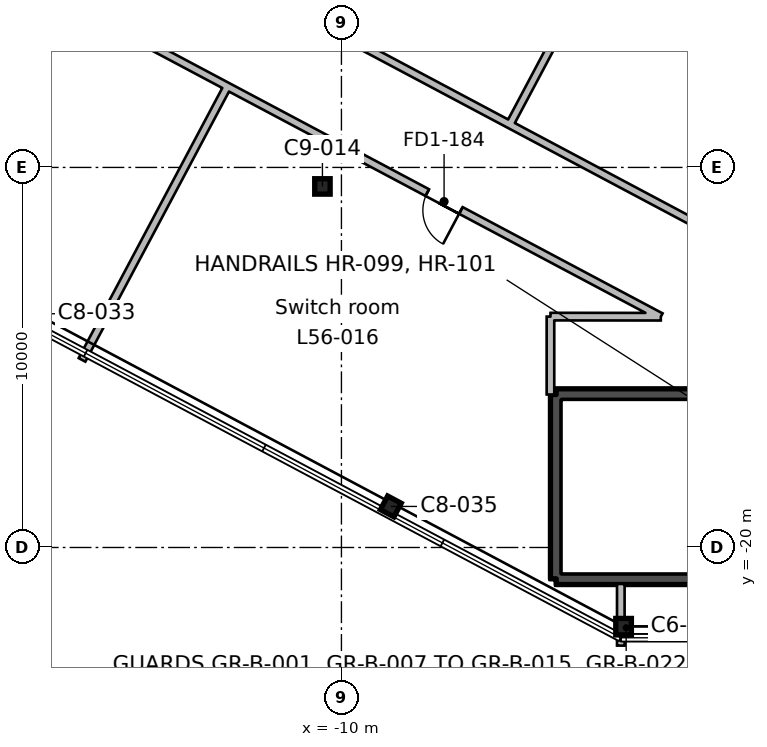
"""IFC4 building model, lengths in metres.
Left out: names, types, materials, properties, quantities, classifications, styles, units other than length and angle.
Written with IfcOpenShell. Run it as: python <this file> out.ifc"""

import sys

from ifc_helpers import new_model, si_unit, direction, frame, frame_2d, origin, origin_2d, place, context, subcontext, project, spatial, rectangle, hollow_rectangle, i_section, extrude, element, fill, save


model = new_model("IFC4")
c1 = context("Model", 3, precision=1e-05, world=origin(), true_north=direction((0.0, 1.0)))
c2 = subcontext(c1, "Body", "Model", "MODEL_VIEW")
j1 = project(units=[si_unit("LENGTHUNIT", "METRE"), si_unit("PLANEANGLEUNIT", "RADIAN")], contexts=[c1])
p1 = place(None, origin())
s1 = spatial("IfcSite", under=j1, at=p1, CompositionType="ELEMENT")
p2 = place(p1, origin())
s2 = spatial("IfcBuilding", under=s1, at=p2, CompositionType="ELEMENT")
p3 = place(p2, frame((0.0, 0.0, 252.0)))
s3 = spatial("IfcBuildingStorey", under=s2, at=p3, CompositionType="ELEMENT", Elevation=252.0)
p4 = place(p3, frame((-2.576, -22.084, 0.0), z_axis=(0.0, 0.0, 1.0), x_axis=(1.0, 0.0, 0.0)))
e1 = element("IfcColumn", 1, at=p4, inside=s3, PredefinedType="COLUMN", context=c2, shape_type="SweptSolid", body=[
    extrude(i_section(OverallWidth=0.412, OverallDepth=0.434, WebThickness=0.036, FlangeThickness=0.057, FilletRadius=0.015, at=origin_2d()), origin(), (0.0, 0.0, 1.0), 6.0),
])
p5 = place(p3, frame((-8.701, -18.92, 0.0), z_axis=(0.0, 0.0, 1.0), x_axis=(0.882947592859, -0.469471562786, 0.0)))
e2 = element("IfcColumn", 2, at=p5, inside=s3, PredefinedType="COLUMN", context=c2, shape_type="SweptSolid", body=[
    extrude(i_section(OverallWidth=0.404, OverallDepth=0.406, WebThickness=0.027, FlangeThickness=0.044, FilletRadius=0.015, at=origin_2d()), origin(), (0.0, 0.0, 1.0), 6.0),
])
p6 = place(p3, frame((-10.5, -10.5, 0.0), z_axis=(0.0, 0.0, 1.0), x_axis=(1.0, 0.0, 0.0)))
e3 = element("IfcColumn", 3, at=p6, inside=s3, PredefinedType="COLUMN", context=c2, shape_type="SweptSolid", body=[
    extrude(hollow_rectangle(XDim=0.406, YDim=0.406, WallThickness=0.015, InnerFilletRadius=0.007, OuterFilletRadius=0.022, at=origin_2d()), origin(), (0.0, 0.0, 1.0), 6.0),
])
p7 = place(p3, frame((3.95, -20.825, 0.0), z_axis=(0.0, 0.0, 1.0), x_axis=(-1.0, 0.0, 0.0)))
e4 = element("IfcWall", 4, at=p7, inside=s3, PredefinedType="SHEAR", context=c2, shape_type="SweptSolid", body=[
    extrude(rectangle(XDim=8.3, YDim=0.3, at=frame_2d((4.15, 0.0))), origin(), (0.0, 0.0, 1.0), 6.0),
])
p8 = place(p3, frame((-4.35, -20.825, 0.0), z_axis=(0.0, 0.0, 1.0), x_axis=(0.0, 1.0, 0.0)))
e5 = element("IfcWall", 5, at=p8, inside=s3, PredefinedType="SHEAR", context=c2, shape_type="SweptSolid", body=[
    extrude(rectangle(XDim=4.85, YDim=0.3, at=frame_2d((2.425, 0.0))), origin(), (0.0, 0.0, 1.0), 6.0),
])
p9 = place(p3, frame((-4.35, -15.975, 0.0), z_axis=(0.0, 0.0, 1.0), x_axis=(1.0, 0.0, 0.0)))
e6 = element("IfcWall", 6, at=p9, inside=s3, PredefinedType="SHEAR", context=c2, shape_type="SweptSolid", body=[
    extrude(rectangle(XDim=8.3, YDim=0.3, at=frame_2d((4.15, 0.0))), origin(), (0.0, 0.0, 1.0), 6.0),
])
p10 = place(p9, frame((6.05, 0.0, 0.0)))
e7 = element("IfcOpeningElement", 7, at=p10, cuts=e6, PredefinedType="OPENING", context=c2, shape_type="SweptSolid", body=[
    extrude(rectangle(XDim=1.9, YDim=2.1, at=frame_2d((0.95, 1.05))), frame((0.0, 0.16, 0.0), z_axis=(0.0, -1.0, 0.0), x_axis=(1.0, 0.0, 0.0)), (0.0, 0.0, 1.0), 0.32),
])
p11 = place(p3, frame((-12.995, -7.871, 0.0), z_axis=(0.0, 0.0, 1.0), x_axis=(-0.882943167342, 0.469479885878, 0.0)))
e8 = element("IfcWall", 8, at=p11, inside=s3, PredefinedType="PARTITIONING", context=c2, shape_type="SweptSolid", body=[
    extrude(rectangle(XDim=36.174, YDim=0.2, at=frame_2d((18.087, 0.0))), origin(), (0.0, 0.0, 1.0), 5.55),
])
p12 = place(p11, frame((21.45, 0.0, 0.0)))
e9 = element("IfcOpeningElement", 9, at=p12, cuts=e8, PredefinedType="OPENING", context=c2, shape_type="SweptSolid", body=[
    extrude(rectangle(XDim=1.0, YDim=2.1, at=frame_2d((0.5, 1.05))), frame((0.0, 0.11, 0.0), z_axis=(0.0, -1.0, 0.0), x_axis=(1.0, 0.0, 0.0)), (0.0, 0.0, 1.0), 0.22),
])
p13 = place(p11, frame((17.55, 0.0, 0.0)))
e10 = element("IfcOpeningElement", 10, at=p13, cuts=e8, PredefinedType="OPENING", context=c2, shape_type="SweptSolid", body=[
    extrude(rectangle(XDim=1.0, YDim=2.1, at=frame_2d((0.5, 1.05))), frame((0.0, 0.11, 0.0), z_axis=(0.0, -1.0, 0.0), x_axis=(1.0, 0.0, 0.0)), (0.0, 0.0, 1.0), 0.22),
])
p14 = place(p3, frame((-12.999, -7.868, 0.0), z_axis=(0.0, 0.0, 1.0), x_axis=(-0.46953845473, -0.882912022531, 0.0)))
e11 = element("IfcWall", 11, at=p14, inside=s3, PredefinedType="PARTITIONING", context=c2, shape_type="SweptSolid", body=[
    extrude(rectangle(XDim=8.15, YDim=0.2, at=frame_2d((4.075, 0.0))), origin(), (0.0, 0.0, 1.0), 5.55),
])
p15 = place(p3, frame((-12.995, -7.871, 0.0), z_axis=(0.0, 0.0, 1.0), x_axis=(0.883081189118, -0.469220218475, 0.0)))
e12 = element("IfcWall", 12, at=p15, inside=s3, PredefinedType="PARTITIONING", context=c2, shape_type="SweptSolid", body=[
    extrude(rectangle(XDim=12.908, YDim=0.2, at=frame_2d((6.454, 0.0))), origin(), (0.0, 0.0, 1.0), 5.55),
])
p16 = place(p15, frame((5.95, 0.0, 0.0)))
e13 = element("IfcOpeningElement", 13, at=p16, cuts=e12, PredefinedType="OPENING", context=c2, shape_type="SweptSolid", body=[
    extrude(rectangle(XDim=1.0, YDim=2.1, at=frame_2d((0.5, 1.05))), frame((0.0, 0.11, 0.0), z_axis=(0.0, -1.0, 0.0), x_axis=(1.0, 0.0, 0.0)), (0.0, 0.0, 1.0), 0.22),
])
p17 = place(p3, frame((-1.596, -13.928, 0.0), z_axis=(0.0, 0.0, 1.0), x_axis=(-0.999999491134, 0.001008826725, 0.0)))
e14 = element("IfcWall", 14, at=p17, inside=s3, PredefinedType="PARTITIONING", context=c2, shape_type="SweptSolid", body=[
    extrude(rectangle(XDim=2.904, YDim=0.2, at=frame_2d((1.452, 0.0))), origin(), (0.0, 0.0, 1.0), 5.55),
])
p18 = place(p3, frame((7.501, 15.713, 0.0), z_axis=(0.0, 0.0, 1.0), x_axis=(-0.46948341094, -0.882941292982, 0.0)))
e15 = element("IfcWall", 15, at=p18, inside=s3, PredefinedType="PARTITIONING", context=c2, shape_type="SweptSolid", body=[
    extrude(rectangle(XDim=27.845, YDim=0.2, at=frame_2d((13.923, 0.0))), origin(), (0.0, 0.0, 1.0), 5.55),
])
p19 = place(p3, frame((-5.572, -8.873, 0.0), z_axis=(0.0, 0.0, 1.0), x_axis=(-0.882928328785, 0.469507791446, 0.0)))
e16 = element("IfcWall", 16, at=p19, inside=s3, PredefinedType="PARTITIONING", context=c2, shape_type="SweptSolid", body=[
    extrude(rectangle(XDim=17.246, YDim=0.2, at=frame_2d((8.623, 0.0))), origin(), (0.0, 0.0, 1.0), 5.55),
])
p20 = place(p3, frame((-0.018, -11.826, 0.0), z_axis=(0.0, 0.0, 1.0), x_axis=(-0.882961394428, 0.469445604889, 0.0)))
e17 = element("IfcWall", 17, at=p20, inside=s3, PredefinedType="PARTITIONING", context=c2, shape_type="SweptSolid", body=[
    extrude(rectangle(XDim=6.29, YDim=0.2, at=frame_2d((3.145, 0.0))), origin(), (0.0, 0.0, 1.0), 5.55),
])
p21 = place(p3, frame((-4.5, -13.925, 0.0), z_axis=(0.0, 0.0, 1.0), x_axis=(0.0, -1.0, 0.0)))
e18 = element("IfcWall", 18, at=p21, inside=s3, PredefinedType="PARTITIONING", context=c2, shape_type="SweptSolid", body=[
    extrude(rectangle(XDim=2.05, YDim=0.2, at=frame_2d((1.025, 0.0))), origin(), (0.0, 0.0, 1.0), 5.55),
])
p22 = place(p3, frame((-2.649, -20.96, 0.0), z_axis=(0.0, 0.0, 1.0), x_axis=(0.0, -1.0, 0.0)))
e19 = element("IfcWall", 19, at=p22, inside=s3, PredefinedType="PARTITIONING", context=c2, shape_type="SweptSolid", body=[
    extrude(rectangle(XDim=1.622, YDim=0.2, at=frame_2d((0.811, 0.0))), origin(), (0.0, 0.0, 1.0), 5.55),
])
p23 = place(p16, frame((1.0, 0.0, 0.0), z_axis=(0.0, 0.0, 1.0), x_axis=(-1.0, 0.0, 0.0)))
e20 = element("IfcDoor", 20, at=p23, inside=s3, OperationType="SINGLE_SWING_LEFT", PredefinedType="DOOR", context=c2, shape_type="SweptSolid", body=[
    extrude(rectangle(XDim=1.0, YDim=2.1, at=frame_2d((0.5, 1.05))), frame((0.0, 0.025, 0.0), z_axis=(0.0, -1.0, 0.0), x_axis=(1.0, 0.0, 0.0)), (0.0, 0.0, 1.0), 0.05),
])
fill(e13, e20)
save(model, sys.argv[1])
